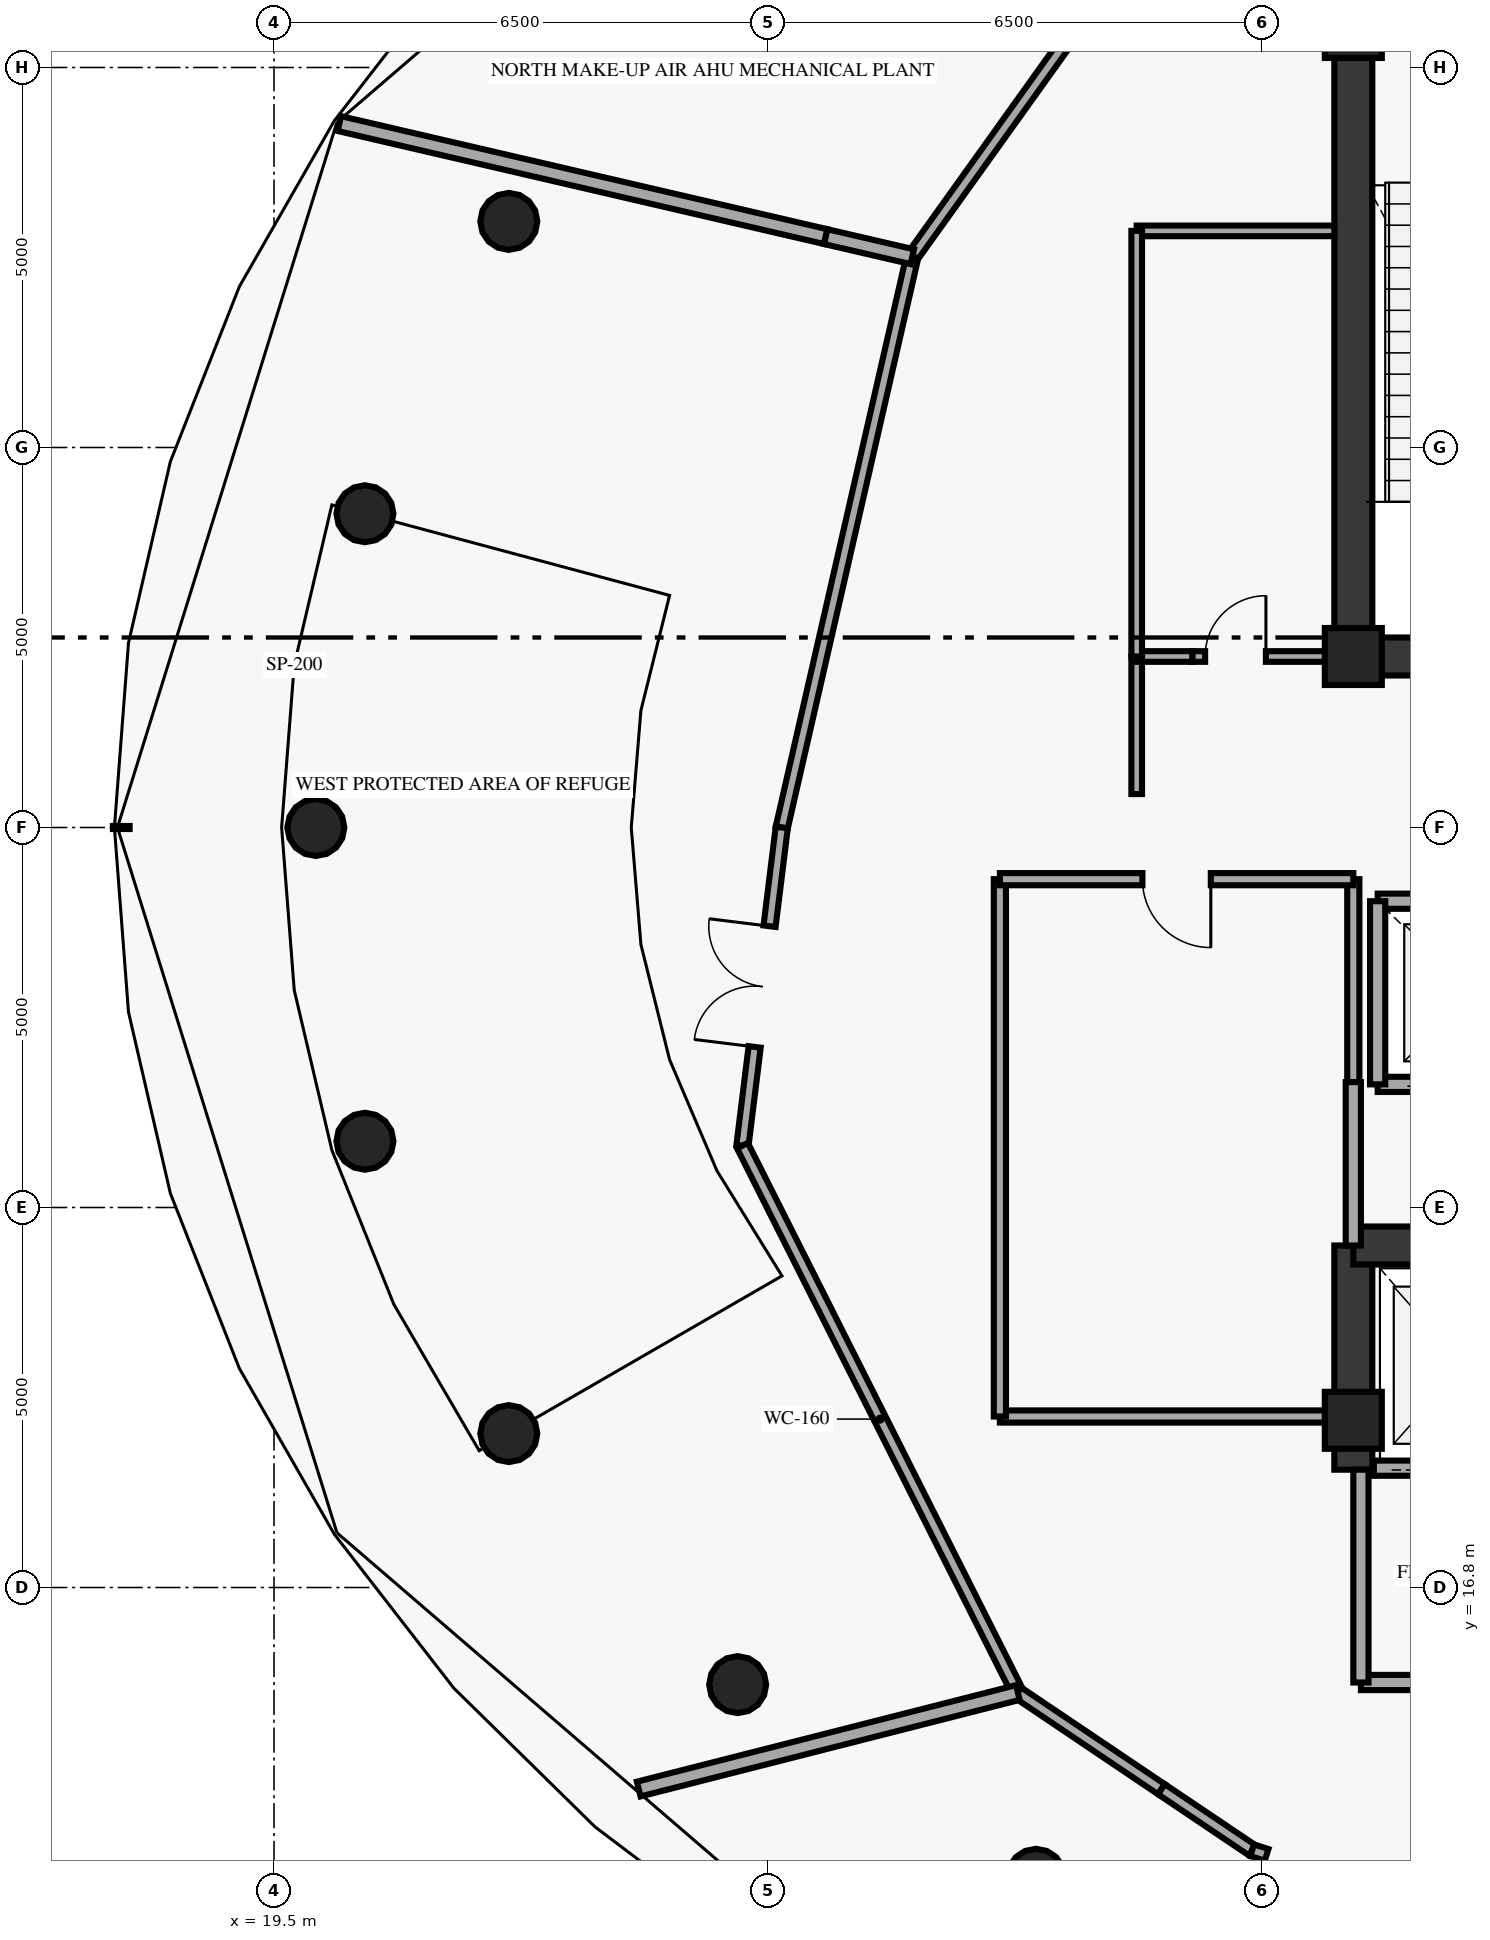
"""IFC4 building model, lengths in metres.
Left out: names, types, materials, properties, quantities, classifications, styles, units other than length and angle.
Written with IfcOpenShell. Run it as: python <this file> out.ifc"""

import sys

from ifc_helpers import new_model, si_unit, direction, frame, frame_2d, origin, origin_2d, place, context, subcontext, project, spatial, rectangle, circle, extrude, element, fill, save


model = new_model("IFC4")
c1 = context("Model", 3, precision=1e-05, world=origin(), true_north=direction((0.0, 1.0)))
c2 = subcontext(c1, "Body", "Model", "MODEL_VIEW")
j1 = project(units=[si_unit("LENGTHUNIT", "METRE"), si_unit("PLANEANGLEUNIT", "RADIAN")], contexts=[c1])
p1 = place(None, origin())
s1 = spatial("IfcSite", under=j1, at=p1, CompositionType="ELEMENT")
p2 = place(p1, origin())
s2 = spatial("IfcBuilding", under=s1, at=p2, CompositionType="ELEMENT")
p3 = place(p2, frame((0.0, 0.0, 301.2)))
s3 = spatial("IfcBuildingStorey", under=s2, at=p3, CompositionType="ELEMENT", Elevation=301.2)
for number, where, z_axis, x_axis in (
    (1, (33.7, 19.0, 0.0), (0.0, 0.0, 1.0), (1.0, 0.0, 0.0)),
    (2, (33.7, 37.3, 0.0), (0.0, 0.0, 1.0), (1.0, 0.0, 0.0)),
    (3, (33.7, 29.05, 0.0), (0.0, 0.0, 1.0), (1.0, 0.0, 0.0)),
):
    element("IfcColumn", number, at=place(p3, frame(where, z_axis=z_axis, x_axis=x_axis)), inside=s3, PredefinedType="PILASTER", context=c2, shape_type="SweptSolid", body=[
        extrude(rectangle(XDim=0.75, YDim=0.75, at=origin_2d()), origin(), (0.0, 0.0, 1.0), 5.25),
    ])
for number, where, z_axis, x_axis in (
    (4, (22.589, 34.775, 0.0), (0.0, 0.0, 1.0), (1.0, 0.0, 0.0)),
    (5, (20.696, 30.928, 0.0), (0.0, 0.0, 1.0), (1.0, 0.0, 0.0)),
    (6, (20.05, 26.8, 0.0), (0.0, 0.0, 1.0), (1.0, 0.0, 0.0)),
    (7, (20.696, 22.672, 0.0), (0.0, 0.0, 1.0), (1.0, 0.0, 0.0)),
    (8, (22.589, 18.825, 0.0), (0.0, 0.0, 1.0), (1.0, 0.0, 0.0)),
    (9, (25.6, 15.522, 0.0), (0.0, 0.0, 1.0), (1.0, 0.0, 0.0)),
    (10, (29.525, 12.987, 0.0), (0.0, 0.0, 1.0), (1.0, 0.0, 0.0)),
):
    element("IfcColumn", number, at=place(p3, frame(where, z_axis=z_axis, x_axis=x_axis)), inside=s3, PredefinedType="COLUMN", context=c2, shape_type="SweptSolid", body=[
        extrude(circle(Radius=0.375, at=origin_2d()), origin(), (0.0, 0.0, 1.0), 5.25),
    ])
p4 = place(p3, frame((33.7, 29.05, 0.0), z_axis=(0.0, 0.0, 1.0), x_axis=(0.0, 1.0, 0.0)))
e11 = element("IfcWall", 11, at=p4, inside=s3, PredefinedType="SHEAR", context=c2, shape_type="SweptSolid", body=[
    extrude(rectangle(XDim=8.35, YDim=0.5, at=frame_2d((4.175, 0.0))), origin(), (0.0, 0.0, 1.0), 5.25),
])
p5 = place(p3, frame((33.7, 18.35, 0.0), z_axis=(0.0, 0.0, 1.0), x_axis=(0.0, 1.0, 0.0)))
e12 = element("IfcWall", 12, at=p5, inside=s3, PredefinedType="SHEAR", context=c2, shape_type="SweptSolid", body=[
    extrude(rectangle(XDim=2.95, YDim=0.5, at=frame_2d((1.475, 0.0))), origin(), (0.0, 0.0, 1.0), 5.25),
])
p6 = place(p3, frame((33.7, 29.05, 0.0), z_axis=(0.0, 0.0, 1.0), x_axis=(1.0, 0.0, 0.0)))
e13 = element("IfcWall", 13, at=p6, inside=s3, PredefinedType="SHEAR", context=c2, shape_type="SweptSolid", body=[
    extrude(rectangle(XDim=10.6, YDim=0.5, at=frame_2d((5.3, 0.0))), origin(), (0.0, 0.0, 1.0), 5.25),
])
p7 = place(p3, frame((33.7, 21.3, 0.0), z_axis=(0.0, 0.0, 1.0), x_axis=(1.0, 0.0, 0.0)))
e14 = element("IfcWall", 14, at=p7, inside=s3, PredefinedType="SHEAR", context=c2, shape_type="SweptSolid", body=[
    extrude(rectangle(XDim=7.55, YDim=0.5, at=frame_2d((3.775, 0.0))), origin(), (0.0, 0.0, 1.0), 5.25),
])
p8 = place(p3, frame((34.02, 23.42, 0.0), z_axis=(0.0, 0.0, 1.0), x_axis=(1.0, 0.0, 0.0)))
e15 = element("IfcWall", 15, at=p8, inside=s3, PredefinedType="SOLIDWALL", context=c2, shape_type="SweptSolid", body=[
    extrude(rectangle(XDim=2.5, YDim=0.2, at=frame_2d((1.25, 0.0))), origin(), (0.0, 0.0, 1.0), 5.25),
])
p9 = place(p8, frame((0.7, 0.0, 0.0)))
e16 = element("IfcOpeningElement", 16, at=p9, cuts=e15, PredefinedType="OPENING", context=c2, shape_type="SweptSolid", body=[
    extrude(rectangle(XDim=1.1, YDim=2.15, at=frame_2d((0.55, 1.075))), frame((0.0, 0.11, 0.0), z_axis=(0.0, -1.0, 0.0), x_axis=(1.0, 0.0, 0.0)), (0.0, 0.0, 1.0), 0.22),
])
p10 = place(p3, frame((34.02, 25.83, 0.0), z_axis=(0.0, 0.0, 1.0), x_axis=(1.0, 0.0, 0.0)))
e17 = element("IfcWall", 17, at=p10, inside=s3, PredefinedType="SOLIDWALL", context=c2, shape_type="SweptSolid", body=[
    extrude(rectangle(XDim=2.5, YDim=0.2, at=frame_2d((1.25, 0.0))), origin(), (0.0, 0.0, 1.0), 5.25),
])
p11 = place(p3, frame((34.02, 23.42, 0.0), z_axis=(0.0, 0.0, 1.0), x_axis=(0.0, 1.0, 0.0)))
e18 = element("IfcWall", 18, at=p11, inside=s3, PredefinedType="SOLIDWALL", context=c2, shape_type="SweptSolid", body=[
    extrude(rectangle(XDim=2.41, YDim=0.2, at=frame_2d((1.205, 0.0))), origin(), (0.0, 0.0, 1.0), 5.25),
])
p12 = place(p3, frame((33.97, 18.37, 0.0), z_axis=(0.0, 0.0, 1.0), x_axis=(1.0, 0.0, 0.0)))
e19 = element("IfcWall", 19, at=p12, inside=s3, PredefinedType="SOLIDWALL", context=c2, shape_type="SweptSolid", body=[
    extrude(rectangle(XDim=2.36, YDim=0.2, at=frame_2d((1.18, 0.0))), origin(), (0.0, 0.0, 1.0), 5.25),
])
p13 = place(p12, frame((0.555, 0.0, 0.0)))
e20 = element("IfcOpeningElement", 20, at=p13, cuts=e19, PredefinedType="OPENING", context=c2, shape_type="SweptSolid", body=[
    extrude(rectangle(XDim=1.25, YDim=2.2, at=frame_2d((0.625, 1.1))), frame((0.0, 0.11, 0.0), z_axis=(0.0, -1.0, 0.0), x_axis=(1.0, 0.0, 0.0)), (0.0, 0.0, 1.0), 0.22),
])
p14 = place(p3, frame((29.05, 19.05, 0.0), z_axis=(0.0, 0.0, 1.0), x_axis=(1.0, 0.0, 0.0)))
e21 = element("IfcWall", 21, at=p14, inside=s3, PredefinedType="PARTITIONING", context=c2, shape_type="SweptSolid", body=[
    extrude(rectangle(XDim=4.65, YDim=0.16, at=frame_2d((2.325, 0.0))), origin(), (0.0, 0.0, 1.0), 5.25),
])
p15 = place(p3, frame((29.05, 19.05, 0.0), z_axis=(0.0, 0.0, 1.0), x_axis=(0.0, 1.0, 0.0)))
e22 = element("IfcWall", 22, at=p15, inside=s3, PredefinedType="PARTITIONING", context=c2, shape_type="SweptSolid", body=[
    extrude(rectangle(XDim=7.07, YDim=0.16, at=frame_2d((3.535, 0.0))), origin(), (0.0, 0.0, 1.0), 5.25),
])
p16 = place(p3, frame((33.7, 23.45, 0.0), z_axis=(0.0, 0.0, 1.0), x_axis=(0.0, 1.0, 0.0)))
e23 = element("IfcWall", 23, at=p16, inside=s3, PredefinedType="PARTITIONING", context=c2, shape_type="SweptSolid", body=[
    extrude(rectangle(XDim=2.67, YDim=0.16, at=frame_2d((1.335, 0.0))), origin(), (0.0, 0.0, 1.0), 4.635),
])
p17 = place(p3, frame((33.7, 26.12, 0.0), z_axis=(0.0, 0.0, 1.0), x_axis=(-1.0, 0.0, 0.0)))
e24 = element("IfcWall", 24, at=p17, inside=s3, PredefinedType="PARTITIONING", context=c2, shape_type="SweptSolid", body=[
    extrude(rectangle(XDim=4.65, YDim=0.16, at=frame_2d((2.325, 0.0))), origin(), (0.0, 0.0, 1.0), 5.25),
])
p18 = place(p17, frame((1.875, 0.0, 0.0)))
e25 = element("IfcOpeningElement", 25, at=p18, cuts=e24, PredefinedType="OPENING", context=c2, shape_type="SweptSolid", body=[
    extrude(rectangle(XDim=0.9, YDim=2.1, at=frame_2d((0.45, 1.05))), frame((0.0, 0.09, 0.0), z_axis=(0.0, -1.0, 0.0), x_axis=(1.0, 0.0, 0.0)), (0.0, 0.0, 1.0), 0.18),
])
p19 = place(p3, frame((33.7, 21.3, 0.0), z_axis=(0.0, 0.0, 1.0), x_axis=(0.0, 1.0, 0.0)))
e26 = element("IfcWall", 26, at=p19, inside=s3, PredefinedType="SOLIDWALL", context=c2, shape_type="SweptSolid", body=[
    extrude(rectangle(XDim=2.15, YDim=0.2, at=frame_2d((1.075, 0.0))), origin(), (0.0, 0.0, 1.0), 4.635),
])
p20 = place(p3, frame((33.8, 15.55, 0.0), z_axis=(0.0, 0.0, 1.0), x_axis=(1.0, 0.0, 0.0)))
e27 = element("IfcWall", 27, at=p20, inside=s3, PredefinedType="SOLIDWALL", context=c2, shape_type="SweptSolid", body=[
    extrude(rectangle(XDim=7.55, YDim=0.2, at=frame_2d((3.775, 0.0))), origin(), (0.0, 0.0, 1.0), 5.25),
])
p21 = place(p3, frame((33.8, 15.55, 0.0), z_axis=(0.0, 0.0, 1.0), x_axis=(0.0, 1.0, 0.0)))
e28 = element("IfcWall", 28, at=p21, inside=s3, PredefinedType="SOLIDWALL", context=c2, shape_type="SweptSolid", body=[
    extrude(rectangle(XDim=2.8, YDim=0.2, at=frame_2d((1.4, 0.0))), origin(), (0.0, 0.0, 1.0), 5.25),
])
p22 = place(p3, frame((30.85, 27.24, 0.0), z_axis=(0.0, 0.0, 1.0), x_axis=(0.0, 1.0, 0.0)))
e29 = element("IfcWall", 29, at=p22, inside=s3, PredefinedType="PARTITIONING", context=c2, shape_type="SweptSolid", body=[
    extrude(rectangle(XDim=1.81, YDim=0.14, at=frame_2d((0.905, 0.0))), origin(), (0.0, 0.0, 1.0), 5.25),
])
p23 = place(p3, frame((30.85, 29.05, 0.0), z_axis=(0.0, 0.0, 1.0), x_axis=(1.0, 0.0, 0.0)))
e30 = element("IfcWall", 30, at=p23, inside=s3, PredefinedType="PARTITIONING", context=c2, shape_type="SweptSolid", body=[
    extrude(rectangle(XDim=0.734, YDim=0.14, at=frame_2d((0.367, 0.0))), origin(), (0.0, 0.0, 1.0), 5.25),
])
p24 = place(p3, frame((31.584, 29.05, 0.0), z_axis=(0.0, 0.0, 1.0), x_axis=(1.0, 0.0, 0.0)))
e31 = element("IfcWall", 31, at=p24, inside=s3, PredefinedType="PARTITIONING", context=c2, shape_type="SweptSolid", body=[
    extrude(rectangle(XDim=1.866, YDim=0.14, at=frame_2d((0.933, 0.0))), origin(), (0.0, 0.0, 1.0), 3.45),
])
p25 = place(p24, frame((0.166, 0.0, 0.0)))
e32 = element("IfcOpeningElement", 32, at=p25, cuts=e31, PredefinedType="OPENING", context=c2, shape_type="SweptSolid", body=[
    extrude(rectangle(XDim=0.8, YDim=2.05, at=frame_2d((0.4, 1.025))), frame((0.0, 0.08, 0.0), z_axis=(0.0, -1.0, 0.0), x_axis=(1.0, 0.0, 0.0)), (0.0, 0.0, 1.0), 0.16),
])
p26 = place(p3, frame((30.85, 34.65, 0.0), z_axis=(0.0, 0.0, 1.0), x_axis=(1.0, 0.0, 0.0)))
e33 = element("IfcWall", 33, at=p26, inside=s3, PredefinedType="PARTITIONING", context=c2, shape_type="SweptSolid", body=[
    extrude(rectangle(XDim=2.6, YDim=0.14, at=frame_2d((1.3, 0.0))), origin(), (0.0, 0.0, 1.0), 5.25),
])
p27 = place(p3, frame((30.85, 29.05, 0.0), z_axis=(0.0, 0.0, 1.0), x_axis=(0.0, 1.0, 0.0)))
e34 = element("IfcWall", 34, at=p27, inside=s3, PredefinedType="PARTITIONING", context=c2, shape_type="SweptSolid", body=[
    extrude(rectangle(XDim=5.6, YDim=0.14, at=frame_2d((2.8, 0.0))), origin(), (0.0, 0.0, 1.0), 5.25),
])
p28 = place(p3, frame((32.281, 40.436, 0.0), z_axis=(0.0, 0.0, 1.0), x_axis=(-0.581884927471, -0.813271130179, 0.0)))
e35 = element("IfcWall", 35, at=p28, inside=s3, PredefinedType="PARTITIONING", context=c2, shape_type="SweptSolid", body=[
    extrude(rectangle(XDim=7.532, YDim=0.16, at=frame_2d((3.766, 0.0))), origin(), (0.0, 0.0, 1.0), 5.25),
])
p29 = place(p3, frame((27.898, 34.31, 0.0), z_axis=(0.0, 0.0, 1.0), x_axis=(-0.223002916051, -0.974817777553, 0.0)))
e36 = element("IfcWall", 36, at=p29, inside=s3, PredefinedType="PARTITIONING", context=c2, shape_type="SweptSolid", body=[
    extrude(rectangle(XDim=7.704, YDim=0.16, at=frame_2d((3.852, 0.0))), origin(), (0.0, 0.0, 1.0), 5.25),
])
p30 = place(p3, frame((25.663, 22.614, 0.0), z_axis=(0.0, 0.0, 1.0), x_axis=(0.122538537921, 0.992463755874, 0.0)))
e37 = element("IfcWall", 37, at=p30, inside=s3, PredefinedType="PARTITIONING", context=c2, shape_type="SweptSolid", body=[
    extrude(rectangle(XDim=4.218, YDim=0.16, at=frame_2d((2.109, 0.0))), origin(), (0.0, 0.0, 1.0), 5.25),
])
p31 = place(p30, frame((1.309, 0.0, 0.0)))
e38 = element("IfcOpeningElement", 38, at=p31, cuts=e37, PredefinedType="OPENING", context=c2, shape_type="SweptSolid", body=[
    extrude(rectangle(XDim=1.6, YDim=2.2, at=frame_2d((0.8, 1.1))), frame((0.0, 0.09, 0.0), z_axis=(0.0, -1.0, 0.0), x_axis=(1.0, 0.0, 0.0)), (0.0, 0.0, 1.0), 0.18),
])
p32 = place(p3, frame((25.663, 22.614, 0.0), z_axis=(0.0, 0.0, 1.0), x_axis=(0.449672541353, -0.893193487187, 0.0)))
e39 = element("IfcWall", 39, at=p32, inside=s3, PredefinedType="PARTITIONING", context=c2, shape_type="SweptSolid", body=[
    extrude(rectangle(XDim=8.057, YDim=0.16, at=frame_2d((4.028, 0.0))), origin(), (0.0, 0.0, 1.0), 5.25),
])
p33 = place(p3, frame((29.286, 15.418, 0.0), z_axis=(0.0, 0.0, 1.0), x_axis=(0.829501793483, -0.558504050665, 0.0)))
e40 = element("IfcWall", 40, at=p33, inside=s3, PredefinedType="PARTITIONING", context=c2, shape_type="SweptSolid", body=[
    extrude(rectangle(XDim=2.277, YDim=0.16, at=frame_2d((1.139, 0.0))), origin(), (0.0, 0.0, 1.0), 5.25),
])
p34 = place(p3, frame((31.175, 14.146, 0.0), z_axis=(0.0, 0.0, 1.0), x_axis=(0.829772117197, -0.558102350401, 0.0)))
e41 = element("IfcWall", 41, at=p34, inside=s3, PredefinedType="PARTITIONING", context=c2, shape_type="SweptSolid", body=[
    extrude(rectangle(XDim=1.439, YDim=0.16, at=frame_2d((0.719, 0.0))), origin(), (0.0, 0.0, 1.0), 3.8),
])
p35 = place(p3, frame((35.682, 12.292, 0.0), z_axis=(0.0, 0.0, 1.0), x_axis=(-0.953183734956, 0.302391744951, 0.0)))
e42 = element("IfcWall", 42, at=p35, inside=s3, PredefinedType="PARTITIONING", context=c2, shape_type="SweptSolid", body=[
    extrude(rectangle(XDim=3.476, YDim=0.16, at=frame_2d((1.738, 0.0))), origin(), (0.0, 0.0, 1.0), 3.8),
])
p36 = place(p35, frame((1.776, 0.0, 0.0)))
e43 = element("IfcOpeningElement", 43, at=p36, cuts=e42, PredefinedType="OPENING", context=c2, shape_type="SweptSolid", body=[
    extrude(rectangle(XDim=1.5, YDim=2.2, at=frame_2d((0.75, 1.1))), frame((0.0, 0.09, 0.0), z_axis=(0.0, -1.0, 0.0), x_axis=(1.0, 0.0, 0.0)), (0.0, 0.0, 1.0), 0.18),
])
p37 = place(p3, frame((27.898, 34.31, 0.0), z_axis=(0.0, 0.0, 1.0), x_axis=(-0.974088180288, 0.226168558873, 0.0)))
e44 = element("IfcWall", 44, at=p37, inside=s3, PredefinedType="SOLIDWALL", context=c2, shape_type="SweptSolid", body=[
    extrude(rectangle(XDim=1.171, YDim=0.2, at=frame_2d((0.585, 0.0))), origin(), (0.0, 0.0, 1.0), 3.45),
])
p38 = place(p3, frame((26.757, 34.575, 0.0), z_axis=(0.0, 0.0, 1.0), x_axis=(-0.974037958158, 0.226384752285, 0.0)))
e45 = element("IfcWall", 45, at=p38, inside=s3, PredefinedType="SOLIDWALL", context=c2, shape_type="SweptSolid", body=[
    extrude(rectangle(XDim=6.569, YDim=0.2, at=frame_2d((3.284, 0.0))), origin(), (0.0, 0.0, 1.0), 5.25),
])
p39 = place(p3, frame((29.286, 15.418, 0.0), z_axis=(0.0, 0.0, 1.0), x_axis=(-0.969078615775, -0.246752176175, 0.0)))
e46 = element("IfcWall", 46, at=p39, inside=s3, PredefinedType="SOLIDWALL", context=c2, shape_type="SweptSolid", body=[
    extrude(rectangle(XDim=5.147, YDim=0.2, at=frame_2d((2.573, 0.0))), origin(), (0.0, 0.0, 1.0), 5.25),
])
p40 = place(p18, origin())
e47 = element("IfcDoor", 47, at=p40, inside=s3, OperationType="SINGLE_SWING_LEFT", PredefinedType="DOOR", context=c2, shape_type="SweptSolid", body=[
    extrude(rectangle(XDim=0.9, YDim=2.1, at=frame_2d((0.45, 1.05))), frame((0.0, 0.025, 0.0), z_axis=(0.0, -1.0, 0.0), x_axis=(1.0, 0.0, 0.0)), (0.0, 0.0, 1.0), 0.05),
])
fill(e25, e47)
p41 = place(p25, origin())
e48 = element("IfcDoor", 48, at=p41, inside=s3, OperationType="SINGLE_SWING_RIGHT", PredefinedType="DOOR", context=c2, shape_type="SweptSolid", body=[
    extrude(rectangle(XDim=0.8, YDim=2.05, at=frame_2d((0.4, 1.025))), frame((0.0, 0.025, 0.0), z_axis=(0.0, -1.0, 0.0), x_axis=(1.0, 0.0, 0.0)), (0.0, 0.0, 1.0), 0.05),
])
fill(e32, e48)
p42 = place(p31, origin())
e49 = element("IfcDoor", 49, at=p42, inside=s3, OperationType="DOUBLE_DOOR_SINGLE_SWING", PredefinedType="DOOR", context=c2, shape_type="SweptSolid", body=[
    extrude(rectangle(XDim=1.6, YDim=2.2, at=frame_2d((0.8, 1.1))), frame((0.0, 0.025, 0.0), z_axis=(0.0, -1.0, 0.0), x_axis=(1.0, 0.0, 0.0)), (0.0, 0.0, 1.0), 0.05),
])
fill(e38, e49)
p43 = place(p36, origin())
e50 = element("IfcDoor", 50, at=p43, inside=s3, OperationType="DOUBLE_DOOR_SINGLE_SWING", PredefinedType="DOOR", context=c2, shape_type="SweptSolid", body=[
    extrude(rectangle(XDim=1.5, YDim=2.2, at=frame_2d((0.75, 1.1))), frame((0.0, 0.025, 0.0), z_axis=(0.0, -1.0, 0.0), x_axis=(1.0, 0.0, 0.0)), (0.0, 0.0, 1.0), 0.05),
])
fill(e43, e50)
save(model, sys.argv[1])
